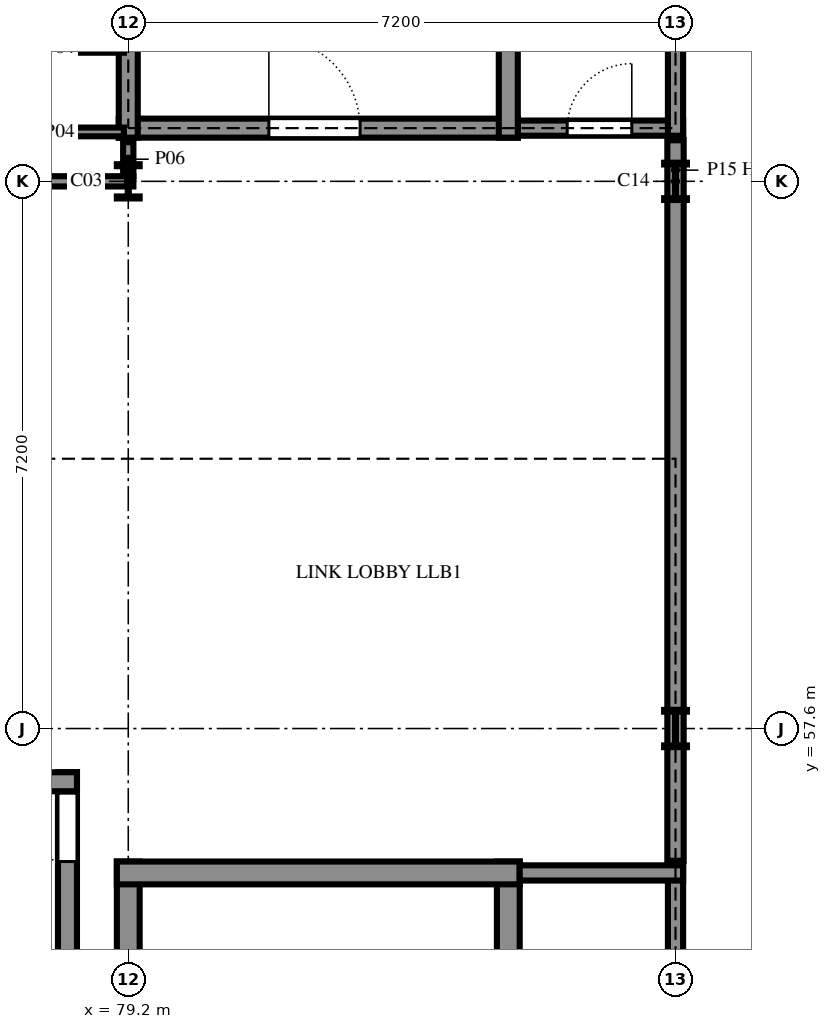
"""IFC4 building model, lengths in metres.
Left out: names, types, materials, properties, quantities, classifications, styles, units other than length and angle.
Written with IfcOpenShell. Run it as: python <this file> out.ifc"""

import sys

from ifc_helpers import new_model, si_unit, direction, frame, frame_2d, origin, origin_2d, place, context, subcontext, project, spatial, rectangle, i_section, extrude, element, fill, save


model = new_model("IFC4")
c1 = context("Model", 3, precision=1e-05, world=origin(), true_north=direction((0.0, 1.0)))
c2 = subcontext(c1, "Body", "Model", "MODEL_VIEW")
j1 = project(units=[si_unit("LENGTHUNIT", "METRE"), si_unit("PLANEANGLEUNIT", "RADIAN")], contexts=[c1])
p1 = place(None, origin())
s1 = spatial("IfcSite", under=j1, at=p1, CompositionType="ELEMENT")
p2 = place(p1, origin())
s2 = spatial("IfcBuilding", under=s1, at=p2, CompositionType="ELEMENT")
p3 = place(p2, frame((0.0, 0.0, 14.4)))
s3 = spatial("IfcBuildingStorey", under=s2, at=p3, CompositionType="ELEMENT", Elevation=14.4)
p4 = place(p3, frame((79.2, 64.8, 0.0), z_axis=(0.0, 0.0, 1.0), x_axis=(1.0, 0.0, 0.0)))
e1 = element("IfcColumn", 1, at=p4, inside=s3, PredefinedType="COLUMN", context=c2, shape_type="SweptSolid", body=[
    extrude(i_section(OverallWidth=0.3, OverallDepth=0.45, WebThickness=0.014, FlangeThickness=0.026, FilletRadius=0.027, at=origin_2d()), origin(), (0.0, 0.0, 1.0), 3.6),
])
for number, where, z_axis, x_axis in (
    (2, (86.4, 57.6, 0.0), (0.0, 0.0, 1.0), (1.0, 0.0, 0.0)),
    (3, (86.4, 64.8, 0.0), (0.0, 0.0, 1.0), (1.0, 0.0, 0.0)),
):
    element("IfcColumn", number, at=place(p3, frame(where, z_axis=z_axis, x_axis=x_axis)), inside=s3, PredefinedType="COLUMN", context=c2, shape_type="SweptSolid", body=[
        extrude(i_section(OverallWidth=0.3, OverallDepth=0.49, WebThickness=0.012, FlangeThickness=0.023, FilletRadius=0.027, at=origin_2d()), origin(), (0.0, 0.0, 1.0), 3.6),
    ])
p5 = place(p3, frame((84.2, 49.05, 0.0), z_axis=(0.0, 0.0, 1.0), x_axis=(0.0, 1.0, 0.0)))
e4 = element("IfcWall", 4, at=p5, inside=s3, PredefinedType="SHEAR", context=c2, shape_type="SweptSolid", body=[
    extrude(rectangle(XDim=6.8, YDim=0.3, at=frame_2d((3.4, 0.0))), origin(), (0.0, 0.0, 1.0), 3.6),
])
p6 = place(p3, frame((86.4, 49.1, 0.0), z_axis=(0.0, 0.0, 1.0), x_axis=(0.0, 1.0, 0.0)))
e5 = element("IfcWall", 5, at=p6, inside=s3, PredefinedType="SHEAR", context=c2, shape_type="SweptSolid", body=[
    extrude(rectangle(XDim=6.7, YDim=0.2, at=frame_2d((3.35, 0.0))), origin(), (0.0, 0.0, 1.0), 3.6),
])
p7 = place(p3, frame((78.4, 50.275, 0.0), z_axis=(0.0, 0.0, 1.0), x_axis=(0.0, 1.0, 0.0)))
e6 = element("IfcWall", 6, at=p7, inside=s3, PredefinedType="SHEAR", context=c2, shape_type="SweptSolid", body=[
    extrude(rectangle(XDim=6.75, YDim=0.25, at=frame_2d((3.375, 0.0))), origin(), (0.0, 0.0, 1.0), 3.6),
])
p8 = place(p7, frame((5.575, 0.0, 0.0)))
e7 = element("IfcOpeningElement", 7, at=p8, cuts=e6, PredefinedType="OPENING", context=c2, shape_type="SweptSolid", body=[
    extrude(rectangle(XDim=0.9, YDim=2.1, at=frame_2d((0.45, 1.05))), frame((0.0, 0.135, 0.0), z_axis=(0.0, -1.0, 0.0), x_axis=(1.0, 0.0, 0.0)), (0.0, 0.0, 1.0), 0.27),
])
p9 = place(p3, frame((79.2, 55.85, 0.0), z_axis=(0.0, 0.0, 1.0), x_axis=(0.0, -1.0, 0.0)))
e8 = element("IfcWall", 8, at=p9, inside=s3, PredefinedType="SHEAR", context=c2, shape_type="SweptSolid", body=[
    extrude(rectangle(XDim=5.325, YDim=0.3, at=frame_2d((2.663, 0.0))), origin(), (0.0, 0.0, 1.0), 3.6),
])
p10 = place(p3, frame((84.35, 55.7, 0.0), z_axis=(0.0, 0.0, 1.0), x_axis=(-1.0, 0.0, 0.0)))
e9 = element("IfcWall", 9, at=p10, inside=s3, PredefinedType="SHEAR", context=c2, shape_type="SweptSolid", body=[
    extrude(rectangle(XDim=5.3, YDim=0.3, at=frame_2d((2.65, 0.0))), origin(), (0.0, 0.0, 1.0), 3.6),
])
p11 = place(p3, frame((86.5, 55.7, 0.0), z_axis=(0.0, 0.0, 1.0), x_axis=(-1.0, 0.0, 0.0)))
e10 = element("IfcWall", 10, at=p11, inside=s3, PredefinedType="SHEAR", context=c2, shape_type="SweptSolid", body=[
    extrude(rectangle(XDim=2.15, YDim=0.2, at=frame_2d((1.075, 0.0))), origin(), (0.0, 0.0, 1.0), 3.6),
])
p12 = place(p3, frame((78.525, 56.9, 0.0), z_axis=(0.0, 0.0, 1.0), x_axis=(-1.0, 0.0, 0.0)))
e11 = element("IfcWall", 11, at=p12, inside=s3, PredefinedType="SHEAR", context=c2, shape_type="SweptSolid", body=[
    extrude(rectangle(XDim=5.0, YDim=0.25, at=frame_2d((2.5, 0.0))), origin(), (0.0, 0.0, 1.0), 3.6),
])
p13 = place(p3, frame((79.075, 65.5, 0.0), z_axis=(0.0, 0.0, 1.0), x_axis=(1.0, 0.0, 0.0)))
e12 = element("IfcWall", 12, at=p13, inside=s3, PredefinedType="SHEAR", context=c2, shape_type="SweptSolid", body=[
    extrude(rectangle(XDim=5.25, YDim=0.25, at=frame_2d((2.625, 0.0))), origin(), (0.0, 0.0, 1.0), 3.6),
])
p14 = place(p13, frame((1.975, 0.0, 0.0)))
e13 = element("IfcOpeningElement", 13, at=p14, cuts=e12, PredefinedType="OPENING", context=c2, shape_type="SweptSolid", body=[
    extrude(rectangle(XDim=1.2, YDim=2.4, at=frame_2d((0.6, 1.2))), frame((0.0, 0.135, 0.0), z_axis=(0.0, -1.0, 0.0), x_axis=(1.0, 0.0, 0.0)), (0.0, 0.0, 1.0), 0.27),
])
p15 = place(p3, frame((84.325, 65.5, 0.0), z_axis=(0.0, 0.0, 1.0), x_axis=(1.0, 0.0, 0.0)))
e14 = element("IfcWall", 14, at=p15, inside=s3, PredefinedType="SHEAR", context=c2, shape_type="SweptSolid", body=[
    extrude(rectangle(XDim=2.175, YDim=0.2, at=frame_2d((1.087, 0.0))), origin(), (0.0, 0.0, 1.0), 3.6),
])
p16 = place(p15, frame((0.65, 0.0, 0.0)))
e15 = element("IfcOpeningElement", 15, at=p16, cuts=e14, PredefinedType="OPENING", context=c2, shape_type="SweptSolid", body=[
    extrude(rectangle(XDim=0.85, YDim=2.1, at=frame_2d((0.425, 1.05))), frame((0.0, 0.11, 0.0), z_axis=(0.0, -1.0, 0.0), x_axis=(1.0, 0.0, 0.0)), (0.0, 0.0, 1.0), 0.22),
])
p17 = place(p3, frame((84.2, 65.375, 0.0), z_axis=(0.0, 0.0, 1.0), x_axis=(0.0, 1.0, 0.0)))
e16 = element("IfcWall", 16, at=p17, inside=s3, PredefinedType="SHEAR", context=c2, shape_type="SweptSolid", body=[
    extrude(rectangle(XDim=6.75, YDim=0.25, at=frame_2d((3.375, 0.0))), origin(), (0.0, 0.0, 1.0), 3.6),
])
p18 = place(p3, frame((86.4, 65.4, 0.0), z_axis=(0.0, 0.0, 1.0), x_axis=(0.0, 1.0, 0.0)))
e17 = element("IfcWall", 17, at=p18, inside=s3, PredefinedType="SHEAR", context=c2, shape_type="SweptSolid", body=[
    extrude(rectangle(XDim=6.7, YDim=0.2, at=frame_2d((3.35, 0.0))), origin(), (0.0, 0.0, 1.0), 3.6),
])
p19 = place(p3, frame((79.2, 72.0, 0.0), z_axis=(0.0, 0.0, 1.0), x_axis=(0.0, -1.0, 0.0)))
e18 = element("IfcWall", 18, at=p19, inside=s3, PredefinedType="SHEAR", context=c2, shape_type="SweptSolid", body=[
    extrude(rectangle(XDim=6.625, YDim=0.25, at=frame_2d((3.312, 0.0))), origin(), (0.0, 0.0, 1.0), 3.6),
])
p20 = place(p3, frame((79.2, 65.315, 0.0), z_axis=(0.0, 0.0, 1.0), x_axis=(0.0, -1.0, 0.0)))
e19 = element("IfcWall", 19, at=p20, inside=s3, PredefinedType="PARTITIONING", context=c2, shape_type="SweptSolid", body=[
    extrude(rectangle(XDim=0.448, YDim=0.135, at=frame_2d((0.224, 0.0))), origin(), (0.0, 0.0, 1.0), 3.42),
])
p21 = place(p3, frame((86.4, 55.86, 0.0), z_axis=(0.0, 0.0, 1.0), x_axis=(0.0, 1.0, 0.0)))
e20 = element("IfcWall", 20, at=p21, inside=s3, PredefinedType="PARTITIONING", context=c2, shape_type="SweptSolid", body=[
    extrude(rectangle(XDim=1.985, YDim=0.215, at=frame_2d((0.992, 0.0))), origin(), (0.0, 0.0, 1.0), 3.6),
])
p22 = place(p3, frame((79.268, 64.8, 0.0), z_axis=(0.0, 0.0, 1.0), x_axis=(-1.0, 0.0, 0.0)))
e21 = element("IfcWall", 21, at=p22, inside=s3, PredefinedType="PARTITIONING", context=c2, shape_type="SweptSolid", body=[
    extrude(rectangle(XDim=7.935, YDim=0.135, at=frame_2d((3.968, 0.0))), origin(), (0.0, 0.0, 1.0), 2.82),
])
for number, where, z_axis, x_axis in (
    (22, (79.143, 65.45, 0.0), (0.0, 0.0, 1.0), (-1.0, 0.0, 0.0)),
    (23, (79.143, 66.55, 0.0), (0.0, 0.0, 1.0), (-1.0, 0.0, 0.0)),
):
    element("IfcWall", number, at=place(p3, frame(where, z_axis=z_axis, x_axis=x_axis)), inside=s3, PredefinedType="PARTITIONING", context=c2, shape_type="SweptSolid", body=[
        extrude(rectangle(XDim=1.685, YDim=0.115, at=frame_2d((0.843, 0.0))), origin(), (0.0, 0.0, 1.0), 3.42),
    ])
p23 = place(p3, frame((86.4, 57.845, 0.0), z_axis=(0.0, 0.0, 1.0), x_axis=(0.0, 1.0, 0.0)))
e24 = element("IfcWall", 24, at=p23, inside=s3, PredefinedType="PARTITIONING", context=c2, shape_type="SweptSolid", body=[
    extrude(rectangle(XDim=6.71, YDim=0.215, at=frame_2d((3.355, 0.0))), origin(), (0.0, 0.0, 1.0), 3.12),
])
p24 = place(p3, frame((86.4, 64.555, 0.0), z_axis=(0.0, 0.0, 1.0), x_axis=(0.0, 1.0, 0.0)))
e25 = element("IfcWall", 25, at=p24, inside=s3, PredefinedType="PARTITIONING", context=c2, shape_type="SweptSolid", body=[
    extrude(rectangle(XDim=0.785, YDim=0.215, at=frame_2d((0.393, 0.0))), origin(), (0.0, 0.0, 1.0), 3.6),
])
p25 = place(p8, origin())
e26 = element("IfcDoor", 26, at=p25, inside=s3, OperationType="SINGLE_SWING_LEFT", PredefinedType="DOOR", context=c2, shape_type="SweptSolid", body=[
    extrude(rectangle(XDim=0.9, YDim=2.1, at=frame_2d((0.45, 1.05))), frame((0.0, 0.025, 0.0), z_axis=(0.0, -1.0, 0.0), x_axis=(1.0, 0.0, 0.0)), (0.0, 0.0, 1.0), 0.05),
])
fill(e7, e26)
p26 = place(p14, origin())
e27 = element("IfcDoor", 27, at=p26, inside=s3, OperationType="SINGLE_SWING_RIGHT", PredefinedType="DOOR", context=c2, shape_type="SweptSolid", body=[
    extrude(rectangle(XDim=1.2, YDim=2.4, at=frame_2d((0.6, 1.2))), frame((0.0, 0.025, 0.0), z_axis=(0.0, -1.0, 0.0), x_axis=(1.0, 0.0, 0.0)), (0.0, 0.0, 1.0), 0.05),
])
fill(e13, e27)
p27 = place(p16, origin())
e28 = element("IfcDoor", 28, at=p27, inside=s3, OperationType="SINGLE_SWING_LEFT", PredefinedType="DOOR", context=c2, shape_type="SweptSolid", body=[
    extrude(rectangle(XDim=0.85, YDim=2.1, at=frame_2d((0.425, 1.05))), frame((0.0, 0.025, 0.0), z_axis=(0.0, -1.0, 0.0), x_axis=(1.0, 0.0, 0.0)), (0.0, 0.0, 1.0), 0.05),
])
fill(e15, e28)
save(model, sys.argv[1])
